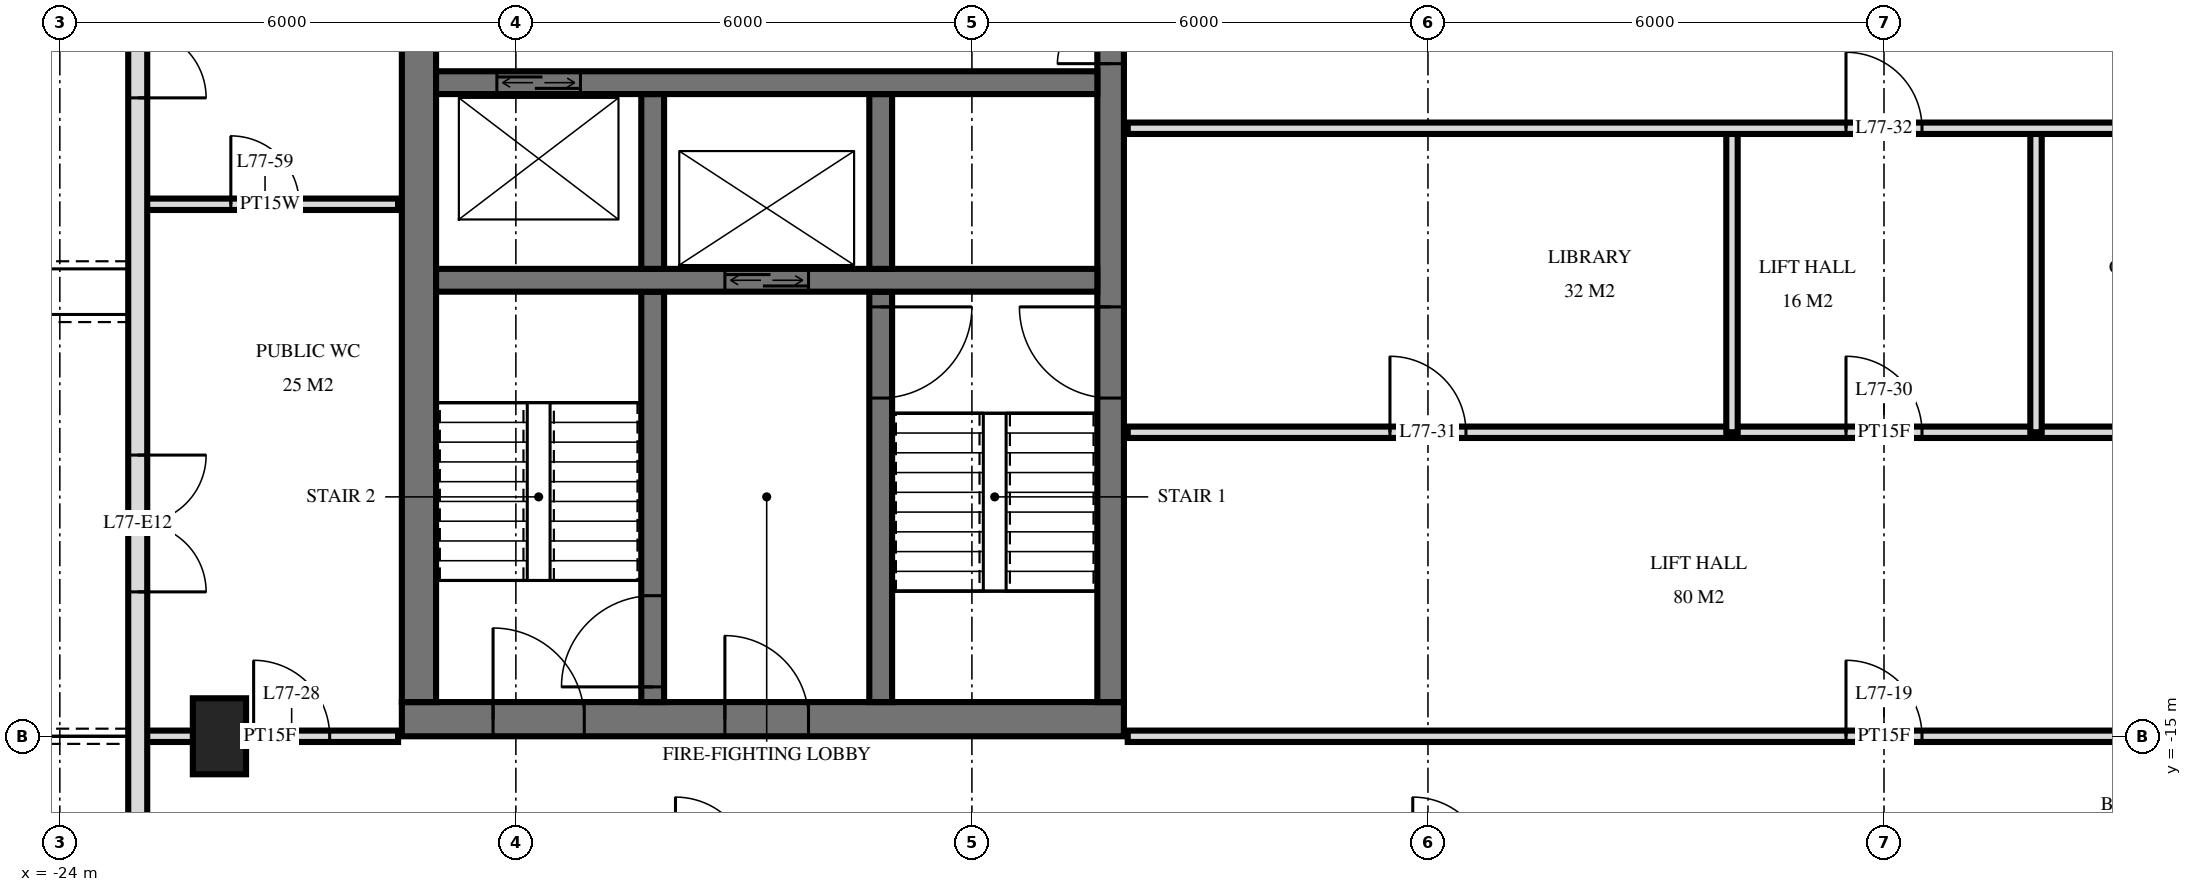
"""IFC4 building model, lengths in metres.
Left out: names, types, materials, properties, quantities, classifications, styles, units other than length and angle.
Written with IfcOpenShell. Run it as: python <this file> out.ifc"""

import sys

from ifc_helpers import new_model, si_unit, direction, frame, frame_2d, origin, origin_2d, place, context, subcontext, project, spatial, rectangle, extrude, element, fill, save


model = new_model("IFC4")
c1 = context("Model", 3, precision=1e-05, world=origin(), true_north=direction((0.0, 1.0)))
c2 = subcontext(c1, "Body", "Model", "MODEL_VIEW")
j1 = project(units=[si_unit("LENGTHUNIT", "METRE"), si_unit("PLANEANGLEUNIT", "RADIAN")], contexts=[c1])
p1 = place(None, origin())
s1 = spatial("IfcSite", under=j1, at=p1, CompositionType="ELEMENT")
p2 = place(p1, origin())
s2 = spatial("IfcBuilding", under=s1, at=p2, CompositionType="ELEMENT")
p3 = place(p2, frame((0.0, 0.0, 291.1)))
s3 = spatial("IfcBuildingStorey", under=s2, at=p3, CompositionType="ELEMENT", Elevation=291.1)
p4 = place(p3, frame((-21.9, -15.0, 0.0), z_axis=(0.0, 0.0, 1.0), x_axis=(0.0, 1.0, 0.0)))
e1 = element("IfcColumn", 1, at=p4, inside=s3, PredefinedType="COLUMN", context=c2, shape_type="SweptSolid", body=[
    extrude(rectangle(XDim=1.0, YDim=0.7, at=origin_2d()), origin(), (0.0, 0.0, 1.0), 3.5),
])
p5 = place(p3, frame((-19.5, -14.775, 0.0), z_axis=(0.0, 0.0, 1.0), x_axis=(1.0, 0.0, 0.0)))
e2 = element("IfcWall", 2, at=p5, inside=s3, PredefinedType="SHEAR", context=c2, shape_type="SweptSolid", body=[
    extrude(rectangle(XDim=9.5, YDim=0.45, at=frame_2d((4.75, 0.0))), origin(), (0.0, 0.0, 1.0), 3.5),
])
p6 = place(p5, frame((1.2, 0.0, 0.0)))
e3 = element("IfcOpeningElement", 3, at=p6, cuts=e2, PredefinedType="OPENING", context=c2, shape_type="SweptSolid", body=[
    extrude(rectangle(XDim=1.2, YDim=2.1, at=frame_2d((0.6, 1.05))), frame((0.0, 0.235, 0.0), z_axis=(0.0, -1.0, 0.0), x_axis=(1.0, 0.0, 0.0)), (0.0, 0.0, 1.0), 0.47),
])
p7 = place(p5, frame((4.25, 0.0, 0.0)))
e4 = element("IfcOpeningElement", 4, at=p7, cuts=e2, PredefinedType="OPENING", context=c2, shape_type="SweptSolid", body=[
    extrude(rectangle(XDim=1.1, YDim=2.1, at=frame_2d((0.55, 1.05))), frame((0.0, 0.235, 0.0), z_axis=(0.0, -1.0, 0.0), x_axis=(1.0, 0.0, 0.0)), (0.0, 0.0, 1.0), 0.47),
])
p8 = place(p3, frame((-10.175, -14.55, 0.0), z_axis=(0.0, 0.0, 1.0), x_axis=(0.0, 1.0, 0.0)))
e5 = element("IfcWall", 5, at=p8, inside=s3, PredefinedType="SHEAR", context=c2, shape_type="SweptSolid", body=[
    extrude(rectangle(XDim=14.1, YDim=0.35, at=frame_2d((7.05, 0.0))), origin(), (0.0, 0.0, 1.0), 3.5),
])
p9 = place(p8, frame((8.4, 0.0, 0.0)))
e6 = element("IfcOpeningElement", 6, at=p9, cuts=e5, PredefinedType="OPENING", context=c2, shape_type="SweptSolid", body=[
    extrude(rectangle(XDim=1.4, YDim=2.4, at=frame_2d((0.7, 1.2))), frame((0.0, 0.185, 0.0), z_axis=(0.0, -1.0, 0.0), x_axis=(1.0, 0.0, 0.0)), (0.0, 0.0, 1.0), 0.37),
])
p10 = place(p8, frame((10.0, 0.0, 0.0)))
e7 = element("IfcOpeningElement", 7, at=p10, cuts=e5, PredefinedType="OPENING", context=c2, shape_type="SweptSolid", body=[
    extrude(rectangle(XDim=1.4, YDim=2.4, at=frame_2d((0.7, 1.2))), frame((0.0, 0.185, 0.0), z_axis=(0.0, -1.0, 0.0), x_axis=(1.0, 0.0, 0.0)), (0.0, 0.0, 1.0), 0.37),
])
p11 = place(p8, frame((4.0, 0.0, 0.0)))
e8 = element("IfcOpeningElement", 8, at=p11, cuts=e5, PredefinedType="OPENING", context=c2, shape_type="SweptSolid", body=[
    extrude(rectangle(XDim=1.2, YDim=2.1, at=frame_2d((0.6, 1.05))), frame((0.0, 0.185, 0.0), z_axis=(0.0, -1.0, 0.0), x_axis=(1.0, 0.0, 0.0)), (0.0, 0.0, 1.0), 0.37),
])
p12 = place(p3, frame((-19.275, -14.55, 0.0), z_axis=(0.0, 0.0, 1.0), x_axis=(0.0, 1.0, 0.0)))
e9 = element("IfcWall", 9, at=p12, inside=s3, PredefinedType="SHEAR", context=c2, shape_type="SweptSolid", body=[
    extrude(rectangle(XDim=14.1, YDim=0.45, at=frame_2d((7.05, 0.0))), origin(), (0.0, 0.0, 1.0), 3.5),
])
p13 = place(p3, frame((-19.05, -6.4, 0.0), z_axis=(0.0, 0.0, 1.0), x_axis=(1.0, 0.0, 0.0)))
e10 = element("IfcWall", 10, at=p13, inside=s3, PredefinedType="SHEAR", context=c2, shape_type="SweptSolid", body=[
    extrude(rectangle(XDim=8.7, YDim=0.3, at=frame_2d((4.35, 0.0))), origin(), (0.0, 0.0, 1.0), 3.5),
])
p14 = place(p13, frame((0.8, 0.0, 0.0)))
e11 = element("IfcOpeningElement", 11, at=p14, cuts=e10, PredefinedType="OPENING", context=c2, shape_type="SweptSolid", body=[
    extrude(rectangle(XDim=1.1, YDim=2.1, at=frame_2d((0.55, 1.05))), frame((0.0, 0.16, 0.0), z_axis=(0.0, -1.0, 0.0), x_axis=(1.0, 0.0, 0.0)), (0.0, 0.0, 1.0), 0.32),
])
p15 = place(p3, frame((-19.05, -9.0, 0.0), z_axis=(0.0, 0.0, 1.0), x_axis=(1.0, 0.0, 0.0)))
e12 = element("IfcWall", 12, at=p15, inside=s3, PredefinedType="SHEAR", context=c2, shape_type="SweptSolid", body=[
    extrude(rectangle(XDim=8.7, YDim=0.3, at=frame_2d((4.35, 0.0))), origin(), (0.0, 0.0, 1.0), 3.5),
])
p16 = place(p15, frame((3.8, 0.0, 0.0)))
e13 = element("IfcOpeningElement", 13, at=p16, cuts=e12, PredefinedType="OPENING", context=c2, shape_type="SweptSolid", body=[
    extrude(rectangle(XDim=1.1, YDim=2.1, at=frame_2d((0.55, 1.05))), frame((0.0, 0.16, 0.0), z_axis=(0.0, -1.0, 0.0), x_axis=(1.0, 0.0, 0.0)), (0.0, 0.0, 1.0), 0.32),
])
p17 = place(p3, frame((-13.2, -8.85, 0.0), z_axis=(0.0, 0.0, 1.0), x_axis=(0.0, 1.0, 0.0)))
e14 = element("IfcWall", 14, at=p17, inside=s3, PredefinedType="SHEAR", context=c2, shape_type="SweptSolid", body=[
    extrude(rectangle(XDim=2.3, YDim=0.3, at=frame_2d((1.15, 0.0))), origin(), (0.0, 0.0, 1.0), 3.5),
])
p18 = place(p3, frame((-13.2, -14.55, 0.0), z_axis=(0.0, 0.0, 1.0), x_axis=(0.0, 1.0, 0.0)))
e15 = element("IfcWall", 15, at=p18, inside=s3, PredefinedType="SHEAR", context=c2, shape_type="SweptSolid", body=[
    extrude(rectangle(XDim=5.4, YDim=0.3, at=frame_2d((2.7, 0.0))), origin(), (0.0, 0.0, 1.0), 3.5),
])
p19 = place(p18, frame((4.0, 0.0, 0.0)))
e16 = element("IfcOpeningElement", 16, at=p19, cuts=e15, PredefinedType="OPENING", context=c2, shape_type="SweptSolid", body=[
    extrude(rectangle(XDim=1.2, YDim=2.1, at=frame_2d((0.6, 1.05))), frame((0.0, 0.16, 0.0), z_axis=(0.0, -1.0, 0.0), x_axis=(1.0, 0.0, 0.0)), (0.0, 0.0, 1.0), 0.32),
])
p20 = place(p3, frame((-16.2, -8.85, 0.0), z_axis=(0.0, 0.0, 1.0), x_axis=(0.0, 1.0, 0.0)))
e17 = element("IfcWall", 17, at=p20, inside=s3, PredefinedType="SHEAR", context=c2, shape_type="SweptSolid", body=[
    extrude(rectangle(XDim=2.3, YDim=0.3, at=frame_2d((1.15, 0.0))), origin(), (0.0, 0.0, 1.0), 3.5),
])
p21 = place(p3, frame((-16.2, -14.55, 0.0), z_axis=(0.0, 0.0, 1.0), x_axis=(0.0, 1.0, 0.0)))
e18 = element("IfcWall", 18, at=p21, inside=s3, PredefinedType="SHEAR", context=c2, shape_type="SweptSolid", body=[
    extrude(rectangle(XDim=5.4, YDim=0.3, at=frame_2d((2.7, 0.0))), origin(), (0.0, 0.0, 1.0), 3.5),
])
p22 = place(p21, frame((0.2, 0.0, 0.0)))
e19 = element("IfcOpeningElement", 19, at=p22, cuts=e18, PredefinedType="OPENING", context=c2, shape_type="SweptSolid", body=[
    extrude(rectangle(XDim=1.2, YDim=2.1, at=frame_2d((0.6, 1.05))), frame((0.0, 0.16, 0.0), z_axis=(0.0, -1.0, 0.0), x_axis=(1.0, 0.0, 0.0)), (0.0, 0.0, 1.0), 0.32),
])
p23 = place(p3, frame((-22.975, -3.325, 0.0), z_axis=(0.0, 0.0, 1.0), x_axis=(0.0, -1.0, 0.0)))
e20 = element("IfcWall", 20, at=p23, inside=s3, PredefinedType="SOLIDWALL", context=c2, shape_type="SweptSolid", body=[
    extrude(rectangle(XDim=25.951, YDim=0.25, at=frame_2d((12.975, 0.0))), origin(), (0.0, 0.0, 1.0), 3.22),
])
p24 = place(p23, frame((1.475, 0.0, 0.0)))
e21 = element("IfcOpeningElement", 21, at=p24, cuts=e20, PredefinedType="OPENING", context=c2, shape_type="SweptSolid", body=[
    extrude(rectangle(XDim=1.8, YDim=2.4, at=frame_2d((0.9, 1.2))), frame((0.0, 0.135, 0.0), z_axis=(0.0, -1.0, 0.0), x_axis=(1.0, 0.0, 0.0)), (0.0, 0.0, 1.0), 0.27),
])
p25 = place(p23, frame((7.975, 0.0, 0.0)))
e22 = element("IfcOpeningElement", 22, at=p25, cuts=e20, PredefinedType="OPENING", context=c2, shape_type="SweptSolid", body=[
    extrude(rectangle(XDim=1.8, YDim=2.4, at=frame_2d((0.9, 1.2))), frame((0.0, 0.135, 0.0), z_axis=(0.0, -1.0, 0.0), x_axis=(1.0, 0.0, 0.0)), (0.0, 0.0, 1.0), 0.27),
])
p26 = place(p23, frame((18.175, 0.0, 0.0)))
e23 = element("IfcOpeningElement", 23, at=p26, cuts=e20, PredefinedType="OPENING", context=c2, shape_type="SweptSolid", body=[
    extrude(rectangle(XDim=1.8, YDim=2.4, at=frame_2d((0.9, 1.2))), frame((0.0, 0.135, 0.0), z_axis=(0.0, -1.0, 0.0), x_axis=(1.0, 0.0, 0.0)), (0.0, 0.0, 1.0), 0.27),
])
p27 = place(p23, frame((21.075, 0.0, 0.0)))
e24 = element("IfcOpeningElement", 24, at=p27, cuts=e20, PredefinedType="OPENING", context=c2, shape_type="SweptSolid", body=[
    extrude(rectangle(XDim=1.8, YDim=2.4, at=frame_2d((0.9, 1.2))), frame((0.0, 0.135, 0.0), z_axis=(0.0, -1.0, 0.0), x_axis=(1.0, 0.0, 0.0)), (0.0, 0.0, 1.0), 0.27),
])
p28 = place(p23, frame((23.825, 0.0, 0.9)))
e25 = element("IfcOpeningElement", 25, at=p28, cuts=e20, PredefinedType="OPENING", context=c2, shape_type="SweptSolid", body=[
    extrude(rectangle(XDim=1.8, YDim=1.5, at=frame_2d((0.9, 0.75))), frame((0.0, 0.135, 0.0), z_axis=(0.0, -1.0, 0.0), x_axis=(1.0, 0.0, 0.0)), (0.0, 0.0, 1.0), 0.27),
])
for number, where, z_axis, x_axis in (
    (26, (2.0, -11.0, 0.0), (0.0, 0.0, 1.0), (0.0, 1.0, 0.0)),
    (27, (-2.0, -11.0, 0.0), (0.0, 0.0, 1.0), (0.0, 1.0, 0.0)),
):
    element("IfcWall", number, at=place(p3, frame(where, z_axis=z_axis, x_axis=x_axis)), inside=s3, PredefinedType="PARTITIONING", context=c2, shape_type="SweptSolid", body=[
        extrude(rectangle(XDim=4.0, YDim=0.15, at=frame_2d((2.0, 0.0))), origin(), (0.0, 0.0, 1.0), 3.22),
    ])
p29 = place(p3, frame((-22.92, -15.0, 0.0), z_axis=(0.0, 0.0, 1.0), x_axis=(1.0, 0.0, 0.0)))
e28 = element("IfcWall", 28, at=p29, inside=s3, PredefinedType="PARTITIONING", context=c2, shape_type="SweptSolid", body=[
    extrude(rectangle(XDim=3.37, YDim=0.15, at=frame_2d((1.685, 0.0))), origin(), (0.0, 0.0, 1.0), 3.22),
])
p30 = place(p29, frame((1.47, 0.0, 0.0)))
e29 = element("IfcOpeningElement", 29, at=p30, cuts=e28, PredefinedType="OPENING", context=c2, shape_type="SweptSolid", body=[
    extrude(rectangle(XDim=1.0, YDim=2.1, at=frame_2d((0.5, 1.05))), frame((0.0, 0.085, 0.0), z_axis=(0.0, -1.0, 0.0), x_axis=(1.0, 0.0, 0.0)), (0.0, 0.0, 1.0), 0.17),
])
p31 = place(p3, frame((-9.95, -15.0, 0.0), z_axis=(0.0, 0.0, 1.0), x_axis=(1.0, 0.0, 0.0)))
e30 = element("IfcWall", 30, at=p31, inside=s3, PredefinedType="PARTITIONING", context=c2, shape_type="SweptSolid", body=[
    extrude(rectangle(XDim=19.9, YDim=0.15, at=frame_2d((9.95, 0.0))), origin(), (0.0, 0.0, 1.0), 2.584),
])
p32 = place(p31, frame((9.45, 0.0, 0.0)))
e31 = element("IfcOpeningElement", 31, at=p32, cuts=e30, PredefinedType="OPENING", context=c2, shape_type="SweptSolid", body=[
    extrude(rectangle(XDim=1.0, YDim=2.1, at=frame_2d((0.5, 1.05))), frame((0.0, 0.085, 0.0), z_axis=(0.0, -1.0, 0.0), x_axis=(1.0, 0.0, 0.0)), (0.0, 0.0, 1.0), 0.17),
])
p33 = place(p3, frame((-9.95, -11.0, 0.0), z_axis=(0.0, 0.0, 1.0), x_axis=(1.0, 0.0, 0.0)))
e32 = element("IfcWall", 32, at=p33, inside=s3, PredefinedType="PARTITIONING", context=c2, shape_type="SweptSolid", body=[
    extrude(rectangle(XDim=19.9, YDim=0.15, at=frame_2d((9.95, 0.0))), origin(), (0.0, 0.0, 1.0), 3.22),
])
p34 = place(p33, frame((9.45, 0.0, 0.0)))
e33 = element("IfcOpeningElement", 33, at=p34, cuts=e32, PredefinedType="OPENING", context=c2, shape_type="SweptSolid", body=[
    extrude(rectangle(XDim=1.0, YDim=2.1, at=frame_2d((0.5, 1.05))), frame((0.0, 0.085, 0.0), z_axis=(0.0, -1.0, 0.0), x_axis=(1.0, 0.0, 0.0)), (0.0, 0.0, 1.0), 0.17),
])
p35 = place(p33, frame((3.45, 0.0, 0.0)))
e34 = element("IfcOpeningElement", 34, at=p35, cuts=e32, PredefinedType="OPENING", context=c2, shape_type="SweptSolid", body=[
    extrude(rectangle(XDim=1.0, YDim=2.1, at=frame_2d((0.5, 1.05))), frame((0.0, 0.085, 0.0), z_axis=(0.0, -1.0, 0.0), x_axis=(1.0, 0.0, 0.0)), (0.0, 0.0, 1.0), 0.17),
])
p36 = place(p3, frame((-22.92, -8.0, 0.0), z_axis=(0.0, 0.0, 1.0), x_axis=(1.0, 0.0, 0.0)))
e35 = element("IfcWall", 35, at=p36, inside=s3, PredefinedType="PLUMBINGWALL", context=c2, shape_type="SweptSolid", body=[
    extrude(rectangle(XDim=3.37, YDim=0.15, at=frame_2d((1.685, 0.0))), origin(), (0.0, 0.0, 1.0), 3.22),
])
p37 = place(p36, frame((1.17, 0.0, 0.0)))
e36 = element("IfcOpeningElement", 36, at=p37, cuts=e35, PredefinedType="OPENING", context=c2, shape_type="SweptSolid", body=[
    extrude(rectangle(XDim=0.9, YDim=2.1, at=frame_2d((0.45, 1.05))), frame((0.0, 0.085, 0.0), z_axis=(0.0, -1.0, 0.0), x_axis=(1.0, 0.0, 0.0)), (0.0, 0.0, 1.0), 0.17),
])
p38 = place(p3, frame((-9.95, -7.0, 0.0), z_axis=(0.0, 0.0, 1.0), x_axis=(1.0, 0.0, 0.0)))
e37 = element("IfcWall", 37, at=p38, inside=s3, PredefinedType="PARTITIONING", context=c2, shape_type="SweptSolid", body=[
    extrude(rectangle(XDim=19.9, YDim=0.15, at=frame_2d((9.95, 0.0))), origin(), (0.0, 0.0, 1.0), 3.22),
])
p39 = place(p38, frame((9.45, 0.0, 0.0)))
e38 = element("IfcOpeningElement", 38, at=p39, cuts=e37, PredefinedType="OPENING", context=c2, shape_type="SweptSolid", body=[
    extrude(rectangle(XDim=1.0, YDim=2.1, at=frame_2d((0.5, 1.05))), frame((0.0, 0.085, 0.0), z_axis=(0.0, -1.0, 0.0), x_axis=(1.0, 0.0, 0.0)), (0.0, 0.0, 1.0), 0.17),
])
p40 = place(p38, frame((15.45, 0.0, 0.0)))
e39 = element("IfcOpeningElement", 39, at=p40, cuts=e37, PredefinedType="OPENING", context=c2, shape_type="SweptSolid", body=[
    extrude(rectangle(XDim=1.0, YDim=2.1, at=frame_2d((0.5, 1.05))), frame((0.0, 0.085, 0.0), z_axis=(0.0, -1.0, 0.0), x_axis=(1.0, 0.0, 0.0)), (0.0, 0.0, 1.0), 0.17),
])
p41 = place(p24, origin())
e40 = element("IfcDoor", 40, at=p41, inside=s3, OperationType="DOUBLE_DOOR_SINGLE_SWING", PredefinedType="DOOR", context=c2, shape_type="SweptSolid", body=[
    extrude(rectangle(XDim=1.8, YDim=2.4, at=frame_2d((0.9, 1.2))), frame((0.0, 0.025, 0.0), z_axis=(0.0, -1.0, 0.0), x_axis=(1.0, 0.0, 0.0)), (0.0, 0.0, 1.0), 0.05),
])
fill(e21, e40)
p42 = place(p25, origin())
e41 = element("IfcDoor", 41, at=p42, inside=s3, OperationType="DOUBLE_DOOR_SINGLE_SWING", PredefinedType="DOOR", context=c2, shape_type="SweptSolid", body=[
    extrude(rectangle(XDim=1.8, YDim=2.4, at=frame_2d((0.9, 1.2))), frame((0.0, 0.025, 0.0), z_axis=(0.0, -1.0, 0.0), x_axis=(1.0, 0.0, 0.0)), (0.0, 0.0, 1.0), 0.05),
])
fill(e22, e41)
p43 = place(p16, origin())
e42 = element("IfcDoor", 42, at=p43, inside=s3, OperationType="DOUBLE_DOOR_SLIDING", PredefinedType="USERDEFINED", context=c2, shape_type="SweptSolid", body=[
    extrude(rectangle(XDim=1.1, YDim=2.1, at=frame_2d((0.55, 1.05))), frame((0.0, 0.025, 0.0), z_axis=(0.0, -1.0, 0.0), x_axis=(1.0, 0.0, 0.0)), (0.0, 0.0, 1.0), 0.05),
])
fill(e13, e42)
p44 = place(p14, origin())
e43 = element("IfcDoor", 43, at=p44, inside=s3, OperationType="DOUBLE_DOOR_SLIDING", PredefinedType="USERDEFINED", context=c2, shape_type="SweptSolid", body=[
    extrude(rectangle(XDim=1.1, YDim=2.1, at=frame_2d((0.55, 1.05))), frame((0.0, 0.025, 0.0), z_axis=(0.0, -1.0, 0.0), x_axis=(1.0, 0.0, 0.0)), (0.0, 0.0, 1.0), 0.05),
])
fill(e11, e43)
p45 = place(p9, origin())
e44 = element("IfcDoor", 44, at=p45, inside=s3, OperationType="DOUBLE_DOOR_SINGLE_SWING", PredefinedType="DOOR", context=c2, shape_type="SweptSolid", body=[
    extrude(rectangle(XDim=1.4, YDim=2.4, at=frame_2d((0.7, 1.2))), frame((0.0, 0.025, 0.0), z_axis=(0.0, -1.0, 0.0), x_axis=(1.0, 0.0, 0.0)), (0.0, 0.0, 1.0), 0.05),
])
fill(e6, e44)
p46 = place(p11, origin())
e45 = element("IfcDoor", 45, at=p46, inside=s3, OperationType="SINGLE_SWING_LEFT", PredefinedType="DOOR", context=c2, shape_type="SweptSolid", body=[
    extrude(rectangle(XDim=1.2, YDim=2.1, at=frame_2d((0.6, 1.05))), frame((0.0, 0.025, 0.0), z_axis=(0.0, -1.0, 0.0), x_axis=(1.0, 0.0, 0.0)), (0.0, 0.0, 1.0), 0.05),
])
fill(e8, e45)
p47 = place(p6, origin())
e46 = element("IfcDoor", 46, at=p47, inside=s3, OperationType="SINGLE_SWING_RIGHT", PredefinedType="DOOR", context=c2, shape_type="SweptSolid", body=[
    extrude(rectangle(XDim=1.2, YDim=2.1, at=frame_2d((0.6, 1.05))), frame((0.0, 0.025, 0.0), z_axis=(0.0, -1.0, 0.0), x_axis=(1.0, 0.0, 0.0)), (0.0, 0.0, 1.0), 0.05),
])
fill(e3, e46)
p48 = place(p7, origin())
e47 = element("IfcDoor", 47, at=p48, inside=s3, OperationType="SINGLE_SWING_RIGHT", PredefinedType="DOOR", context=c2, shape_type="SweptSolid", body=[
    extrude(rectangle(XDim=1.1, YDim=2.1, at=frame_2d((0.55, 1.05))), frame((0.0, 0.025, 0.0), z_axis=(0.0, -1.0, 0.0), x_axis=(1.0, 0.0, 0.0)), (0.0, 0.0, 1.0), 0.05),
])
fill(e4, e47)
p49 = place(p19, frame((0.6, 0.0, 0.0), z_axis=(0.0, 0.0, 1.0), x_axis=(-1.0, 0.0, 0.0)))
e48 = element("IfcDoor", 48, at=p49, inside=s3, OperationType="SINGLE_SWING_RIGHT", PredefinedType="DOOR", context=c2, shape_type="SweptSolid", body=[
    extrude(rectangle(XDim=1.2, YDim=2.1, at=frame_2d((0.0, 1.05))), frame((0.0, -0.025, 0.0), z_axis=(0.0, 1.0, 0.0), x_axis=(-1.0, 0.0, 0.0)), (0.0, 0.0, 1.0), 0.05),
])
fill(e16, e48)
p50 = place(p22, origin())
e49 = element("IfcDoor", 49, at=p50, inside=s3, OperationType="SINGLE_SWING_RIGHT", PredefinedType="DOOR", context=c2, shape_type="SweptSolid", body=[
    extrude(rectangle(XDim=1.2, YDim=2.1, at=frame_2d((0.6, 1.05))), frame((0.0, 0.025, 0.0), z_axis=(0.0, -1.0, 0.0), x_axis=(1.0, 0.0, 0.0)), (0.0, 0.0, 1.0), 0.05),
])
fill(e19, e49)
p51 = place(p32, origin())
e50 = element("IfcDoor", 50, at=p51, inside=s3, OperationType="SINGLE_SWING_RIGHT", PredefinedType="DOOR", context=c2, shape_type="SweptSolid", body=[
    extrude(rectangle(XDim=1.0, YDim=2.1, at=frame_2d((0.5, 1.05))), frame((0.0, 0.025, 0.0), z_axis=(0.0, -1.0, 0.0), x_axis=(1.0, 0.0, 0.0)), (0.0, 0.0, 1.0), 0.05),
])
fill(e31, e50)
p52 = place(p30, origin())
e51 = element("IfcDoor", 51, at=p52, inside=s3, OperationType="SINGLE_SWING_RIGHT", PredefinedType="DOOR", context=c2, shape_type="SweptSolid", body=[
    extrude(rectangle(XDim=1.0, YDim=2.1, at=frame_2d((0.5, 1.05))), frame((0.0, 0.025, 0.0), z_axis=(0.0, -1.0, 0.0), x_axis=(1.0, 0.0, 0.0)), (0.0, 0.0, 1.0), 0.05),
])
fill(e29, e51)
p53 = place(p34, origin())
e52 = element("IfcDoor", 52, at=p53, inside=s3, OperationType="SINGLE_SWING_RIGHT", PredefinedType="DOOR", context=c2, shape_type="SweptSolid", body=[
    extrude(rectangle(XDim=1.0, YDim=2.1, at=frame_2d((0.5, 1.05))), frame((0.0, 0.025, 0.0), z_axis=(0.0, -1.0, 0.0), x_axis=(1.0, 0.0, 0.0)), (0.0, 0.0, 1.0), 0.05),
])
fill(e33, e52)
p54 = place(p35, origin())
e53 = element("IfcDoor", 53, at=p54, inside=s3, OperationType="SINGLE_SWING_RIGHT", PredefinedType="DOOR", context=c2, shape_type="SweptSolid", body=[
    extrude(rectangle(XDim=1.0, YDim=2.1, at=frame_2d((0.5, 1.05))), frame((0.0, 0.025, 0.0), z_axis=(0.0, -1.0, 0.0), x_axis=(1.0, 0.0, 0.0)), (0.0, 0.0, 1.0), 0.05),
])
fill(e34, e53)
p55 = place(p39, origin())
e54 = element("IfcDoor", 54, at=p55, inside=s3, OperationType="SINGLE_SWING_RIGHT", PredefinedType="DOOR", context=c2, shape_type="SweptSolid", body=[
    extrude(rectangle(XDim=1.0, YDim=2.1, at=frame_2d((0.5, 1.05))), frame((0.0, 0.025, 0.0), z_axis=(0.0, -1.0, 0.0), x_axis=(1.0, 0.0, 0.0)), (0.0, 0.0, 1.0), 0.05),
])
fill(e38, e54)
p56 = place(p37, origin())
e55 = element("IfcDoor", 55, at=p56, inside=s3, OperationType="SINGLE_SWING_RIGHT", PredefinedType="DOOR", context=c2, shape_type="SweptSolid", body=[
    extrude(rectangle(XDim=0.9, YDim=2.1, at=frame_2d((0.45, 1.05))), frame((0.0, 0.025, 0.0), z_axis=(0.0, -1.0, 0.0), x_axis=(1.0, 0.0, 0.0)), (0.0, 0.0, 1.0), 0.05),
])
fill(e36, e55)
save(model, sys.argv[1])
